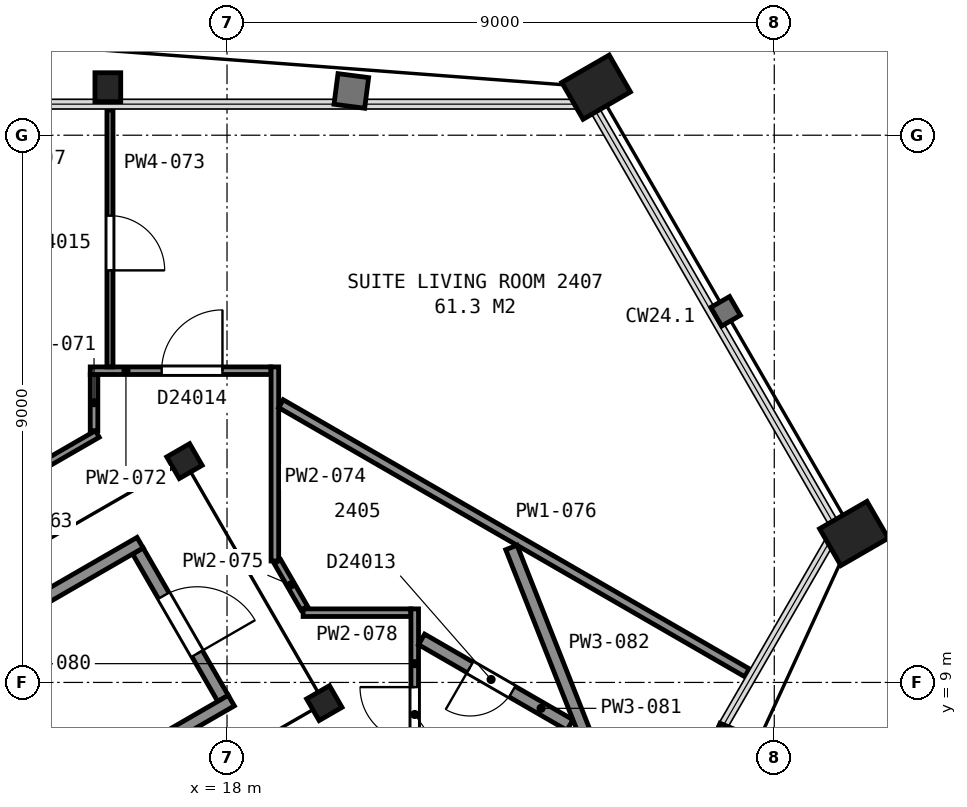
"""IFC4 building model, lengths in metres.
Left out: names, types, materials, properties, quantities, classifications, styles, units other than length and angle.
Written with IfcOpenShell. Run it as: python <this file> out.ifc"""

import sys

from ifc_helpers import new_model, si_unit, direction, frame, frame_2d, origin, origin_2d, place, context, subcontext, project, spatial, rectangle, hollow_rectangle, i_section, extrude, element, fill, save


model = new_model("IFC4")
c1 = context("Model", 3, precision=1e-05, world=origin(), true_north=direction((0.0, 1.0)))
c2 = subcontext(c1, "Body", "Model", "MODEL_VIEW")
j1 = project(units=[si_unit("LENGTHUNIT", "METRE"), si_unit("PLANEANGLEUNIT", "RADIAN")], contexts=[c1])
p1 = place(None, origin())
s1 = spatial("IfcSite", under=j1, at=p1, CompositionType="ELEMENT")
p2 = place(p1, origin())
s2 = spatial("IfcBuilding", under=s1, at=p2, CompositionType="ELEMENT")
p3 = place(p2, frame((0.0, 0.0, 103.6)))
s3 = spatial("IfcBuildingStorey", under=s2, at=p3, CompositionType="ELEMENT", Elevation=103.6)
p4 = place(p3, frame((24.07, 18.79, 0.075), z_axis=(0.0, 0.0, 1.0), x_axis=(0.5, -0.866025403784, 0.0)))
e1 = element("IfcColumn", 1, at=p4, inside=s3, PredefinedType="COLUMN", context=c2, shape_type="SweptSolid", body=[
    extrude(hollow_rectangle(XDim=0.7, YDim=0.9, WallThickness=0.065, at=origin_2d()), origin(), (0.0, 0.0, 1.0), 3.525),
])
p5 = place(p3, frame((16.04, 18.79, 0.045), z_axis=(0.0, 0.0, 1.0), x_axis=(1.0, 0.0, 0.0)))
e2 = element("IfcColumn", 2, at=p5, inside=s3, PredefinedType="COLUMN", context=c2, shape_type="SweptSolid", body=[
    extrude(i_section(OverallWidth=0.424, OverallDepth=0.475, WebThickness=0.048, FlangeThickness=0.077, FilletRadius=0.015, at=origin_2d()), origin(), (0.0, 0.0, 1.0), 3.555),
])
p6 = place(p3, frame((28.31, 11.45, 0.075), z_axis=(0.0, 0.0, 1.0), x_axis=(0.5, -0.866025403784, 0.0)))
e3 = element("IfcColumn", 3, at=p6, inside=s3, PredefinedType="COLUMN", context=c2, shape_type="SweptSolid", body=[
    extrude(hollow_rectangle(XDim=0.7, YDim=0.9, WallThickness=0.065, at=origin_2d()), origin(), (0.0, 0.0, 1.0), 3.525),
])
for number, where, z_axis, x_axis in (
    (4, (19.6, 8.66, 0.0), (0.0, 0.0, 1.0), (0.5, -0.866, 0.0)),
    (5, (17.3, 12.64, 0.0), (0.0, 0.0, 1.0), (0.5, -0.866, 0.0)),
):
    element("IfcColumn", number, at=place(p3, frame(where, z_axis=z_axis, x_axis=x_axis)), inside=s3, PredefinedType="COLUMN", context=c2, shape_type="SweptSolid", body=[
        extrude(i_section(OverallWidth=0.411, OverallDepth=0.434, WebThickness=0.036, FlangeThickness=0.057, FilletRadius=0.015, at=origin_2d()), origin(), (0.0, 0.0, 1.0), 3.6),
    ])
p7 = place(p3, frame((17.934, 8.738, 0.0), z_axis=(0.0, 0.0, 1.0), x_axis=(-0.49998411664, 0.866034573852, 0.0)))
e6 = element("IfcWall", 6, at=p7, inside=s3, PredefinedType="PARTITIONING", context=c2, shape_type="SweptSolid", body=[
    extrude(rectangle(XDim=2.8, YDim=0.2, at=frame_2d((1.4, 0.0))), origin(), (0.0, 0.0, 1.0), 3.35),
])
p8 = place(p7, frame((0.85, 0.0, 0.0)))
e7 = element("IfcOpeningElement", 7, at=p8, cuts=e6, PredefinedType="OPENING", context=c2, shape_type="SweptSolid", body=[
    extrude(rectangle(XDim=1.1, YDim=2.1, at=frame_2d((0.55, 1.05))), frame((0.0, 0.11, 0.0), z_axis=(0.0, -1.0, 0.0), x_axis=(1.0, 0.0, 0.0)), (0.0, 0.0, 1.0), 0.22),
])
for number, where, z_axis, x_axis in (
    (8, (6.178, 5.299, 0.0), (0.0, 0.0, 1.0), (0.866, 0.5, 0.0)),
    (9, (7.678, 2.701, 0.0), (0.0, 0.0, 1.0), (0.866, 0.5, 0.0)),
):
    element("IfcWall", number, at=place(p3, frame(where, z_axis=z_axis, x_axis=x_axis)), inside=s3, PredefinedType="PARTITIONING", context=c2, shape_type="SweptSolid", body=[
        extrude(rectangle(XDim=12.0, YDim=0.2, at=frame_2d((6.0, 0.0))), origin(), (0.0, 0.0, 1.0), 3.35),
    ])
p9 = place(p3, frame((12.327, 11.042, 0.0), z_axis=(0.0, 0.0, 1.0), x_axis=(0.866070231021, 0.499922348909, 0.0)))
e10 = element("IfcWall", 10, at=p9, inside=s3, PredefinedType="PARTITIONING", context=c2, shape_type="SweptSolid", body=[
    extrude(rectangle(XDim=4.088, YDim=0.125, at=frame_2d((2.044, 0.0))), origin(), (0.0, 0.0, 1.0), 2.613),
])
p10 = place(p3, frame((15.813, 13.14, 0.0), z_axis=(0.0, 0.0, 1.0), x_axis=(0.0, 1.0, 0.0)))
e11 = element("IfcWall", 11, at=p10, inside=s3, PredefinedType="PARTITIONING", context=c2, shape_type="SweptSolid", body=[
    extrude(rectangle(XDim=0.922, YDim=0.125, at=frame_2d((0.461, 0.0))), origin(), (0.0, 0.0, 1.0), 2.613),
])
p11 = place(p3, frame((15.75, 14.127, 0.0), z_axis=(0.0, 0.0, 1.0), x_axis=(1.0, 0.0, 0.0)))
e12 = element("IfcWall", 12, at=p11, inside=s3, PredefinedType="PARTITIONING", context=c2, shape_type="SweptSolid", body=[
    extrude(rectangle(XDim=2.971, YDim=0.125, at=frame_2d((1.486, 0.0))), origin(), (0.0, 0.0, 1.0), 2.613),
])
p12 = place(p11, frame((1.175, 0.0, 0.0)))
e13 = element("IfcOpeningElement", 13, at=p12, cuts=e12, PredefinedType="OPENING", context=c2, shape_type="SweptSolid", body=[
    extrude(rectangle(XDim=1.0, YDim=2.1, at=frame_2d((0.5, 1.05))), frame((0.0, 0.073, 0.0), z_axis=(0.0, -1.0, 0.0), x_axis=(1.0, 0.0, 0.0)), (0.0, 0.0, 1.0), 0.145),
])
p13 = place(p3, frame((16.075, 14.189, 0.0), z_axis=(0.0, 0.0, 1.0), x_axis=(0.0, 1.0, 0.0)))
e14 = element("IfcWall", 14, at=p13, inside=s3, PredefinedType="PARTITIONING", context=c2, shape_type="SweptSolid", body=[
    extrude(rectangle(XDim=4.226, YDim=0.1, at=frame_2d((2.113, 0.0))), origin(), (0.0, 0.0, 1.0), 2.613),
])
p14 = place(p13, frame((1.587, 0.0, 0.0)))
e15 = element("IfcOpeningElement", 15, at=p14, cuts=e14, PredefinedType="OPENING", context=c2, shape_type="SweptSolid", body=[
    extrude(rectangle(XDim=0.9, YDim=2.1, at=frame_2d((0.45, 1.05))), frame((0.0, 0.06, 0.0), z_axis=(0.0, -1.0, 0.0), x_axis=(1.0, 0.0, 0.0)), (0.0, 0.0, 1.0), 0.12),
])
p15 = place(p3, frame((18.787, 10.998, 0.0), z_axis=(0.0, 0.0, 1.0), x_axis=(0.0, 1.0, 0.0)))
e16 = element("IfcWall", 16, at=p15, inside=s3, PredefinedType="PARTITIONING", context=c2, shape_type="SweptSolid", body=[
    extrude(rectangle(XDim=3.192, YDim=0.125, at=frame_2d((1.596, 0.0))), origin(), (0.0, 0.0, 1.0), 2.613),
])
p16 = place(p3, frame((18.83, 10.986, 0.0), z_axis=(0.0, 0.0, 1.0), x_axis=(0.499881837328, -0.866093614288, 0.0)))
e17 = element("IfcWall", 17, at=p16, inside=s3, PredefinedType="PARTITIONING", context=c2, shape_type="SweptSolid", body=[
    extrude(rectangle(XDim=0.884, YDim=0.125, at=frame_2d((0.442, 0.0))), origin(), (0.0, 0.0, 1.0), 2.613),
])
p17 = place(p3, frame((18.887, 13.584, 0.0), z_axis=(0.0, 0.0, 1.0), x_axis=(0.866024349092, -0.500001826776, 0.0)))
e18 = element("IfcWall", 18, at=p17, inside=s3, PredefinedType="PARTITIONING", context=c2, shape_type="SweptSolid", body=[
    extrude(rectangle(XDim=8.851, YDim=0.15, at=frame_2d((4.425, 0.0))), origin(), (0.0, 0.0, 1.0), 2.613),
])
p18 = place(p3, frame((19.251, 10.147, 0.0), z_axis=(0.0, 0.0, 1.0), x_axis=(1.0, 0.0, 0.0)))
e19 = element("IfcWall", 19, at=p18, inside=s3, PredefinedType="PARTITIONING", context=c2, shape_type="SweptSolid", body=[
    extrude(rectangle(XDim=1.771, YDim=0.125, at=frame_2d((0.885, 0.0))), origin(), (0.0, 0.0, 1.0), 2.613),
])
p19 = place(p3, frame((21.087, 10.209, 0.0), z_axis=(0.0, 0.0, 1.0), x_axis=(0.0, -1.0, 0.0)))
e20 = element("IfcWall", 20, at=p19, inside=s3, PredefinedType="PARTITIONING", context=c2, shape_type="SweptSolid", body=[
    extrude(rectangle(XDim=3.099, YDim=0.125, at=frame_2d((1.549, 0.0))), origin(), (0.0, 0.0, 1.0), 2.613),
])
p20 = place(p19, frame((1.287, 0.0, 0.0)))
e21 = element("IfcOpeningElement", 21, at=p20, cuts=e20, PredefinedType="OPENING", context=c2, shape_type="SweptSolid", body=[
    extrude(rectangle(XDim=0.9, YDim=2.1, at=frame_2d((0.45, 1.05))), frame((0.0, 0.073, 0.0), z_axis=(0.0, -1.0, 0.0), x_axis=(1.0, 0.0, 0.0)), (0.0, 0.0, 1.0), 0.145),
])
p21 = place(p3, frame((21.199, 9.708, 0.0), z_axis=(0.0, 0.0, 1.0), x_axis=(0.866129327763, -0.499819955173, 0.0)))
e22 = element("IfcWall", 22, at=p21, inside=s3, PredefinedType="PARTITIONING", context=c2, shape_type="SweptSolid", body=[
    extrude(rectangle(XDim=2.818, YDim=0.2, at=frame_2d((1.409, 0.0))), origin(), (0.0, 0.0, 1.0), 2.613),
])
p22 = place(p21, frame((0.92, 0.0, 0.0)))
e23 = element("IfcOpeningElement", 23, at=p22, cuts=e22, PredefinedType="OPENING", context=c2, shape_type="SweptSolid", body=[
    extrude(rectangle(XDim=0.8, YDim=2.1, at=frame_2d((0.4, 1.05))), frame((0.0, 0.11, 0.0), z_axis=(0.0, -1.0, 0.0), x_axis=(1.0, 0.0, 0.0)), (0.0, 0.0, 1.0), 0.22),
])
p23 = place(p3, frame((22.677, 11.22, 0.0), z_axis=(0.0, 0.0, 1.0), x_axis=(0.36751707294, -0.930016774632, 0.0)))
e24 = element("IfcWall", 24, at=p23, inside=s3, PredefinedType="PARTITIONING", context=c2, shape_type="SweptSolid", body=[
    extrude(rectangle(XDim=3.393, YDim=0.2, at=frame_2d((1.697, 0.0))), origin(), (0.0, 0.0, 1.0), 2.613),
])
p24 = place(p8, origin())
e25 = element("IfcDoor", 25, at=p24, inside=s3, OperationType="SINGLE_SWING_LEFT", PredefinedType="DOOR", context=c2, shape_type="SweptSolid", body=[
    extrude(rectangle(XDim=1.1, YDim=2.1, at=frame_2d((0.55, 1.05))), frame((0.0, 0.025, 0.0), z_axis=(0.0, -1.0, 0.0), x_axis=(1.0, 0.0, 0.0)), (0.0, 0.0, 1.0), 0.05),
])
fill(e7, e25)
p25 = place(p12, origin())
e26 = element("IfcDoor", 26, at=p25, inside=s3, OperationType="SINGLE_SWING_RIGHT", PredefinedType="DOOR", context=c2, shape_type="SweptSolid", body=[
    extrude(rectangle(XDim=1.0, YDim=2.1, at=frame_2d((0.5, 1.05))), frame((0.0, 0.025, 0.0), z_axis=(0.0, -1.0, 0.0), x_axis=(1.0, 0.0, 0.0)), (0.0, 0.0, 1.0), 0.05),
])
fill(e13, e26)
p26 = place(p14, origin())
e27 = element("IfcDoor", 27, at=p26, inside=s3, OperationType="SINGLE_SWING_LEFT", PredefinedType="DOOR", context=c2, shape_type="SweptSolid", body=[
    extrude(rectangle(XDim=0.9, YDim=2.1, at=frame_2d((0.45, 1.05))), frame((0.0, 0.025, 0.0), z_axis=(0.0, -1.0, 0.0), x_axis=(1.0, 0.0, 0.0)), (0.0, 0.0, 1.0), 0.05),
])
fill(e15, e27)
p27 = place(p20, origin())
e28 = element("IfcDoor", 28, at=p27, inside=s3, OperationType="SINGLE_SWING_LEFT", PredefinedType="DOOR", context=c2, shape_type="SweptSolid", body=[
    extrude(rectangle(XDim=0.9, YDim=2.1, at=frame_2d((0.45, 1.05))), frame((0.0, 0.025, 0.0), z_axis=(0.0, -1.0, 0.0), x_axis=(1.0, 0.0, 0.0)), (0.0, 0.0, 1.0), 0.05),
])
fill(e21, e28)
p28 = place(p22, origin())
e29 = element("IfcDoor", 29, at=p28, inside=s3, OperationType="SINGLE_SWING_LEFT", PredefinedType="DOOR", context=c2, shape_type="SweptSolid", body=[
    extrude(rectangle(XDim=0.8, YDim=2.1, at=frame_2d((0.4, 1.05))), frame((0.0, 0.025, 0.0), z_axis=(0.0, -1.0, 0.0), x_axis=(1.0, 0.0, 0.0)), (0.0, 0.0, 1.0), 0.05),
])
fill(e23, e29)
save(model, sys.argv[1])
